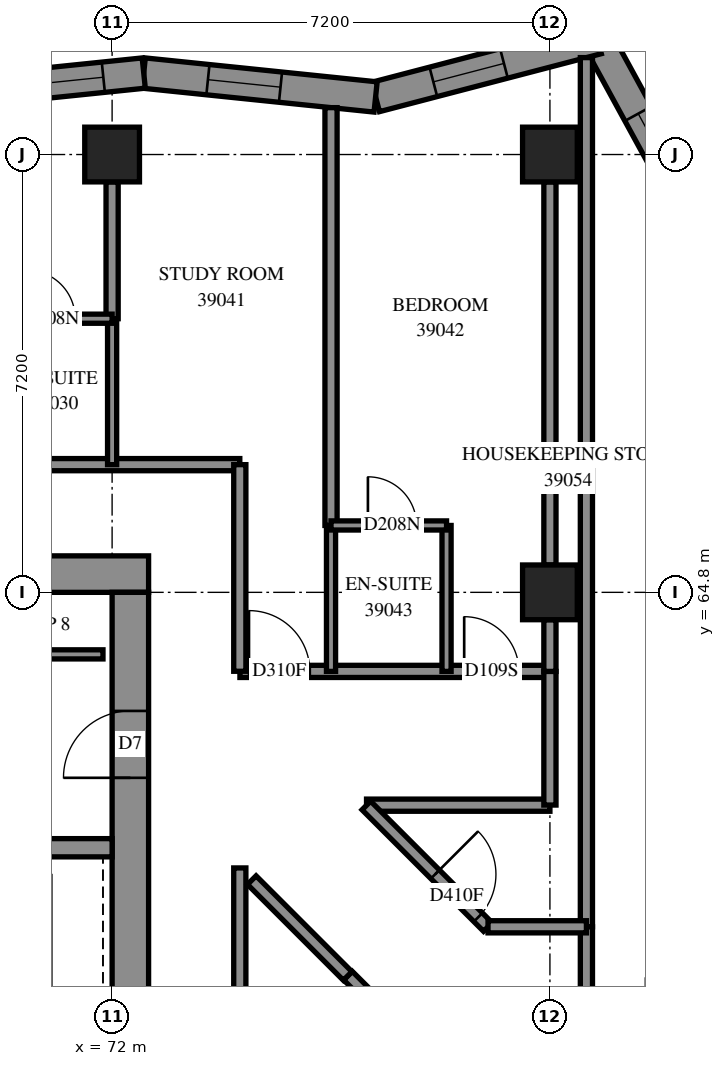
"""IFC4 building model, lengths in metres.
Left out: names, types, materials, properties, quantities, classifications, styles, units other than length and angle.
Written with IfcOpenShell. Run it as: python <this file> out.ifc"""

import sys

from ifc_helpers import new_model, si_unit, direction, frame, frame_2d, origin, origin_2d, place, context, subcontext, project, spatial, polyline, rectangle, outline, extrude, element, fill, save


model = new_model("IFC4")
c1 = context("Model", 3, precision=1e-05, world=origin(), true_north=direction((0.0, 1.0)))
c2 = subcontext(c1, "Body", "Model", "MODEL_VIEW")
j1 = project(units=[si_unit("LENGTHUNIT", "METRE"), si_unit("PLANEANGLEUNIT", "RADIAN")], contexts=[c1])
p1 = place(None, origin())
s1 = spatial("IfcSite", under=j1, at=p1, CompositionType="ELEMENT")
p2 = place(p1, origin())
s2 = spatial("IfcBuilding", under=s1, at=p2, CompositionType="ELEMENT")
p3 = place(p2, frame((0.0, 0.0, 145.6)))
s3 = spatial("IfcBuildingStorey", under=s2, at=p3, CompositionType="ELEMENT", Elevation=145.6)
for number, where, z_axis, x_axis in (
    (1, (72.0, 72.0, 0.0), (0.0, 0.0, 1.0), (1.0, 0.0, 0.0)),
    (2, (79.2, 64.8, 0.0), (0.0, 0.0, 1.0), (1.0, 0.0, 0.0)),
    (3, (79.2, 72.0, 0.0), (0.0, 0.0, 1.0), (1.0, 0.0, 0.0)),
):
    element("IfcColumn", number, at=place(p3, frame(where, z_axis=z_axis, x_axis=x_axis)), inside=s3, PredefinedType="COLUMN", context=c2, shape_type="SweptSolid", body=[
        extrude(rectangle(XDim=0.9, YDim=0.9, at=origin_2d()), origin(), (0.0, 0.0, 1.0), 3.1),
    ])
p4 = place(p3, frame((57.0, 65.1, -0.3), z_axis=(0.0, 0.0, 1.0), x_axis=(1.0, 0.0, 0.0)))
e4 = element("IfcWall", 4, at=p4, inside=s3, PredefinedType="SHEAR", context=c2, shape_type="SweptSolid", body=[
    extrude(rectangle(XDim=15.6, YDim=0.6, at=frame_2d((7.8, 0.0))), origin(), (0.0, 0.0, 1.0), 2.7),
])
p5 = place(p4, frame((10.6, 0.0, 0.3)))
e5 = element("IfcOpeningElement", 5, at=p5, cuts=e4, PredefinedType="OPENING", context=c2, shape_type="SweptSolid", body=[
    extrude(rectangle(XDim=0.8, YDim=2.1, at=frame_2d((0.4, 1.05))), frame((0.0, 0.31, 0.0), z_axis=(0.0, -1.0, 0.0), x_axis=(1.0, 0.0, 0.0)), (0.0, 0.0, 1.0), 0.62),
])
p6 = place(p3, frame((72.3, 50.4, -0.3), z_axis=(0.0, 0.0, 1.0), x_axis=(0.0, 1.0, 0.0)))
e6 = element("IfcWall", 6, at=p6, inside=s3, PredefinedType="SHEAR", context=c2, shape_type="SweptSolid", body=[
    extrude(rectangle(XDim=14.4, YDim=0.6, at=frame_2d((7.2, 0.0))), origin(), (0.0, 0.0, 1.0), 2.7),
])
p7 = place(p6, frame((4.55, 0.0, 0.3)))
e7 = element("IfcOpeningElement", 7, at=p7, cuts=e6, PredefinedType="OPENING", context=c2, shape_type="SweptSolid", body=[
    extrude(rectangle(XDim=1.1, YDim=2.1, at=frame_2d((0.55, 1.05))), frame((0.0, 0.31, 0.0), z_axis=(0.0, -1.0, 0.0), x_axis=(1.0, 0.0, 0.0)), (0.0, 0.0, 1.0), 0.62),
])
p8 = place(p6, frame((11.35, 0.0, 0.3)))
e8 = element("IfcOpeningElement", 8, at=p8, cuts=e6, PredefinedType="OPENING", context=c2, shape_type="SweptSolid", body=[
    extrude(rectangle(XDim=1.1, YDim=2.1, at=frame_2d((0.55, 1.05))), frame((0.0, 0.31, 0.0), z_axis=(0.0, -1.0, 0.0), x_axis=(1.0, 0.0, 0.0)), (0.0, 0.0, 1.0), 0.62),
])
p9 = place(p3, frame((64.8, 60.6, 0.0), z_axis=(0.0, 0.0, 1.0), x_axis=(1.0, 0.0, 0.0)))
e9 = element("IfcWall", 9, at=p9, inside=s3, PredefinedType="SOLIDWALL", context=c2, shape_type="SweptSolid", body=[
    extrude(rectangle(XDim=7.2, YDim=0.3, at=frame_2d((3.6, 0.0))), origin(), (0.0, 0.0, 1.0), 3.1),
])
p10 = place(p3, frame((76.442, 49.302, -0.3), z_axis=(0.0, 0.0, 1.0), x_axis=(0.7071067812, 0.7071067812, 0.0)))
e10 = element("IfcWall", 10, at=p10, inside=s3, PredefinedType="SHEAR", context=c2, shape_type="SweptSolid", body=[
    extrude(rectangle(XDim=14.4, YDim=0.6, at=frame_2d((7.2, 0.0))), origin(), (0.0, 0.0, 1.0), 2.7),
])
p11 = place(p10, frame((4.55, 0.0, 0.3)))
e11 = element("IfcOpeningElement", 11, at=p11, cuts=e10, PredefinedType="OPENING", context=c2, shape_type="SweptSolid", body=[
    extrude(rectangle(XDim=1.1, YDim=2.1, at=frame_2d((0.55, 1.05))), frame((0.0, 0.31, 0.0), z_axis=(0.0, -1.0, 0.0), x_axis=(1.0, 0.0, 0.0)), (0.0, 0.0, 1.0), 0.62),
])
p12 = place(p10, frame((11.35, 0.0, 0.3)))
e12 = element("IfcOpeningElement", 12, at=p12, cuts=e10, PredefinedType="OPENING", context=c2, shape_type="SweptSolid", body=[
    extrude(rectangle(XDim=1.1, YDim=2.1, at=frame_2d((0.55, 1.05))), frame((0.0, 0.31, 0.0), z_axis=(0.0, -1.0, 0.0), x_axis=(1.0, 0.0, 0.0)), (0.0, 0.0, 1.0), 0.62),
])
p13 = place(p3, frame((81.599, 70.939, 0.0), z_axis=(0.0, 0.0, 1.0), x_axis=(-0.4792902898, 0.8776564351, 0.0)))
e13 = element("IfcWall", 13, at=p13, inside=s3, PredefinedType="SOLIDWALL", context=c2, shape_type="SweptSolid", body=[
    extrude(outline(polyline([(0.051, -0.25), (3.569, -0.25), (3.178, 0.25), (-0.051, 0.25), (0.051, -0.25)])), origin(), (0.0, 0.0, 1.0), 3.1),
])
p14 = place(p13, frame((0.775, 0.0, 0.45)))
e14 = element("IfcOpeningElement", 14, at=p14, cuts=e13, PredefinedType="OPENING", context=c2, shape_type="SweptSolid", body=[
    extrude(rectangle(XDim=1.2, YDim=2.5, at=frame_2d((0.6, 1.25))), frame((0.0, 0.26, 0.0), z_axis=(0.0, -1.0, 0.0), x_axis=(1.0, 0.0, 0.0)), (0.0, 0.0, 1.0), 0.52),
])
p15 = place(p3, frame((79.982, 73.9, 0.0), z_axis=(0.0, 0.0, 1.0), x_axis=(-0.9675383728, -0.2527241522, 0.0)))
e15 = element("IfcWall", 15, at=p15, inside=s3, PredefinedType="SOLIDWALL", context=c2, shape_type="SweptSolid", body=[
    extrude(outline(polyline([(-0.195, -0.25), (3.726, -0.25), (3.816, 0.25), (0.195, 0.25), (-0.195, -0.25)])), origin(), (0.0, 0.0, 1.0), 3.1),
])
p16 = place(p15, frame((1.589, 0.0, 0.45)))
e16 = element("IfcOpeningElement", 16, at=p16, cuts=e15, PredefinedType="OPENING", context=c2, shape_type="SweptSolid", body=[
    extrude(rectangle(XDim=1.2, YDim=2.5, at=frame_2d((0.6, 1.25))), frame((0.0, 0.26, 0.0), z_axis=(0.0, -1.0, 0.0), x_axis=(1.0, 0.0, 0.0)), (0.0, 0.0, 1.0), 0.52),
])
p17 = place(p3, frame((76.333, 72.947, 0.0), z_axis=(0.0, 0.0, 1.0), x_axis=(-0.994730395, 0.10252532, 0.0)))
e17 = element("IfcWall", 17, at=p17, inside=s3, PredefinedType="SOLIDWALL", context=c2, shape_type="SweptSolid", body=[
    extrude(outline(polyline([(0.045, -0.25), (3.859, -0.25), (3.808, 0.25), (-0.045, 0.25), (0.045, -0.25)])), origin(), (0.0, 0.0, 1.0), 3.1),
])
p18 = place(p17, frame((1.572, 0.0, 0.45)))
e18 = element("IfcOpeningElement", 18, at=p18, cuts=e17, PredefinedType="OPENING", context=c2, shape_type="SweptSolid", body=[
    extrude(rectangle(XDim=1.2, YDim=2.5, at=frame_2d((0.6, 1.25))), frame((0.0, 0.26, 0.0), z_axis=(0.0, -1.0, 0.0), x_axis=(1.0, 0.0, 0.0)), (0.0, 0.0, 1.0), 0.52),
])
p19 = place(p3, frame((72.52, 73.34, 0.0), z_axis=(0.0, 0.0, 1.0), x_axis=(-0.9947306832, -0.1025225234, 0.0)))
e19 = element("IfcWall", 19, at=p19, inside=s3, PredefinedType="SOLIDWALL", context=c2, shape_type="SweptSolid", body=[
    extrude(outline(polyline([(-0.026, -0.25), (3.788, -0.25), (3.84, 0.25), (0.026, 0.25), (-0.026, -0.25)])), origin(), (0.0, 0.0, 1.0), 3.1),
])
p20 = place(p19, frame((0.668, 0.0, 0.45)))
e20 = element("IfcOpeningElement", 20, at=p20, cuts=e19, PredefinedType="OPENING", context=c2, shape_type="SweptSolid", body=[
    extrude(rectangle(XDim=2.8, YDim=2.5, at=frame_2d((1.4, 1.25))), frame((0.0, 0.26, 0.0), z_axis=(0.0, -1.0, 0.0), x_axis=(1.0, 0.0, 0.0)), (0.0, 0.0, 1.0), 0.52),
])
p21 = place(p3, frame((64.95, 63.78, 0.0), z_axis=(0.0, 0.0, 1.0), x_axis=(1.0, 0.0, 0.0)))
e21 = element("IfcWall", 21, at=p21, inside=s3, PredefinedType="PARTITIONING", context=c2, shape_type="SweptSolid", body=[
    extrude(rectangle(XDim=6.9, YDim=0.15, at=frame_2d((3.45, 0.0))), origin(), (0.0, 0.0, 1.0), 3.1),
])
p22 = place(p3, frame((55.5, 66.9, 0.0), z_axis=(0.0, 0.0, 1.0), x_axis=(1.0, 0.0, 0.0)))
e22 = element("IfcWall", 22, at=p22, inside=s3, PredefinedType="PARTITIONING", context=c2, shape_type="SweptSolid", body=[
    extrude(rectangle(XDim=18.6, YDim=0.2, at=frame_2d((9.3, 0.0))), origin(), (0.0, 0.0, 1.0), 3.1),
])
p23 = place(p22, frame((4.4, 0.0, 0.0)))
e23 = element("IfcOpeningElement", 23, at=p23, cuts=e22, PredefinedType="OPENING", context=c2, shape_type="SweptSolid", body=[
    extrude(rectangle(XDim=0.9, YDim=2.1, at=frame_2d((0.45, 1.05))), frame((0.0, 0.11, 0.0), z_axis=(0.0, -1.0, 0.0), x_axis=(1.0, 0.0, 0.0)), (0.0, 0.0, 1.0), 0.22),
])
p24 = place(p22, frame((6.1, 0.0, 0.0)))
e24 = element("IfcOpeningElement", 24, at=p24, cuts=e22, PredefinedType="OPENING", context=c2, shape_type="SweptSolid", body=[
    extrude(rectangle(XDim=0.9, YDim=2.1, at=frame_2d((0.45, 1.05))), frame((0.0, 0.11, 0.0), z_axis=(0.0, -1.0, 0.0), x_axis=(1.0, 0.0, 0.0)), (0.0, 0.0, 1.0), 0.22),
])
p25 = place(p22, frame((11.65, 0.0, 0.0)))
e25 = element("IfcOpeningElement", 25, at=p25, cuts=e22, PredefinedType="OPENING", context=c2, shape_type="SweptSolid", body=[
    extrude(rectangle(XDim=0.9, YDim=2.1, at=frame_2d((0.45, 1.05))), frame((0.0, 0.11, 0.0), z_axis=(0.0, -1.0, 0.0), x_axis=(1.0, 0.0, 0.0)), (0.0, 0.0, 1.0), 0.22),
])
p26 = place(p22, frame((13.3, 0.0, 0.0)))
e26 = element("IfcOpeningElement", 26, at=p26, cuts=e22, PredefinedType="OPENING", context=c2, shape_type="SweptSolid", body=[
    extrude(rectangle(XDim=0.9, YDim=2.1, at=frame_2d((0.45, 1.05))), frame((0.0, 0.11, 0.0), z_axis=(0.0, -1.0, 0.0), x_axis=(1.0, 0.0, 0.0)), (0.0, 0.0, 1.0), 0.22),
])
p27 = place(p3, frame((79.8, 59.3, 0.0), z_axis=(0.0, 0.0, 1.0), x_axis=(0.0, 1.0, 0.0)))
e27 = element("IfcWall", 27, at=p27, inside=s3, PredefinedType="PARTITIONING", context=c2, shape_type="SweptSolid", body=[
    extrude(rectangle(XDim=14.294, YDim=0.2, at=frame_2d((7.147, 0.0))), origin(), (0.0, 0.0, 1.0), 3.1),
])
p28 = place(p3, frame((75.6, 65.9, 0.0), z_axis=(0.0, 0.0, 1.0), x_axis=(0.0, 1.0, 0.0)))
e28 = element("IfcWall", 28, at=p28, inside=s3, PredefinedType="PARTITIONING", context=c2, shape_type="SweptSolid", body=[
    extrude(rectangle(XDim=6.871, YDim=0.2, at=frame_2d((3.435, 0.0))), origin(), (0.0, 0.0, 1.0), 3.1),
])
p29 = place(p3, frame((74.1, 53.902, 0.0), z_axis=(0.0, 0.0, 1.0), x_axis=(0.0, 1.0, 0.0)))
e29 = element("IfcWall", 29, at=p29, inside=s3, PredefinedType="PARTITIONING", context=c2, shape_type="SweptSolid", body=[
    extrude(rectangle(XDim=6.366, YDim=0.2, at=frame_2d((3.183, 0.0))), origin(), (0.0, 0.0, 1.0), 3.1),
])
p30 = place(p3, frame((79.2, 65.25, 0.0), z_axis=(0.0, 0.0, 1.0), x_axis=(0.0, 1.0, 0.0)))
e30 = element("IfcWall", 30, at=p30, inside=s3, PredefinedType="PARTITIONING", context=c2, shape_type="SweptSolid", body=[
    extrude(rectangle(XDim=6.3, YDim=0.2, at=frame_2d((3.15, 0.0))), origin(), (0.0, 0.0, 1.0), 3.1),
])
p31 = place(p3, frame((74.102, 63.5, 0.0), z_axis=(0.0, 0.0, 1.0), x_axis=(1.0, 0.0, 0.0)))
e31 = element("IfcWall", 31, at=p31, inside=s3, PredefinedType="PARTITIONING", context=c2, shape_type="SweptSolid", body=[
    extrude(rectangle(XDim=5.098, YDim=0.2, at=frame_2d((2.549, 0.0))), origin(), (0.0, 0.0, 1.0), 3.1),
])
p32 = place(p31, frame((0.149, 0.0, 0.0)))
e32 = element("IfcOpeningElement", 32, at=p32, cuts=e31, PredefinedType="OPENING", context=c2, shape_type="SweptSolid", body=[
    extrude(rectangle(XDim=1.0, YDim=2.1, at=frame_2d((0.5, 1.05))), frame((0.0, 0.11, 0.0), z_axis=(0.0, -1.0, 0.0), x_axis=(1.0, 0.0, 0.0)), (0.0, 0.0, 1.0), 0.22),
])
p33 = place(p31, frame((3.688, 0.0, 0.0)))
e33 = element("IfcOpeningElement", 33, at=p33, cuts=e31, PredefinedType="OPENING", context=c2, shape_type="SweptSolid", body=[
    extrude(rectangle(XDim=0.9, YDim=2.1, at=frame_2d((0.45, 1.05))), frame((0.0, 0.11, 0.0), z_axis=(0.0, -1.0, 0.0), x_axis=(1.0, 0.0, 0.0)), (0.0, 0.0, 1.0), 0.22),
])
p34 = place(p3, frame((79.8, 55.49, 0.0), z_axis=(0.0, 0.0, 1.0), x_axis=(0.0, 1.0, 0.0)))
e34 = element("IfcWall", 34, at=p34, inside=s3, PredefinedType="PARTITIONING", context=c2, shape_type="SweptSolid", body=[
    extrude(rectangle(XDim=3.81, YDim=0.2, at=frame_2d((1.905, 0.0))), origin(), (0.0, 0.0, 1.0), 3.1),
])
p35 = place(p3, frame((74.1, 63.502, 0.0), z_axis=(0.0, 0.0, 1.0), x_axis=(0.0, 1.0, 0.0)))
e35 = element("IfcWall", 35, at=p35, inside=s3, PredefinedType="PARTITIONING", context=c2, shape_type="SweptSolid", body=[
    extrude(rectangle(XDim=3.398, YDim=0.2, at=frame_2d((1.699, 0.0))), origin(), (0.0, 0.0, 1.0), 3.1),
])
p36 = place(p3, frame((76.184, 61.3, 0.0), z_axis=(0.0, 0.0, 1.0), x_axis=(1.0, 0.0, 0.0)))
e36 = element("IfcWall", 36, at=p36, inside=s3, PredefinedType="PARTITIONING", context=c2, shape_type="SweptSolid", body=[
    extrude(rectangle(XDim=3.016, YDim=0.2, at=frame_2d((1.508, 0.0))), origin(), (0.0, 0.0, 1.0), 3.1),
])
p37 = place(p3, frame((76.181, 61.295, 0.0), z_axis=(0.0, 0.0, 1.0), x_axis=(0.7071067812, -0.7071067812, 0.0)))
e37 = element("IfcWall", 37, at=p37, inside=s3, PredefinedType="PARTITIONING", context=c2, shape_type="SweptSolid", body=[
    extrude(rectangle(XDim=2.826, YDim=0.2, at=frame_2d((1.413, 0.0))), origin(), (0.0, 0.0, 1.0), 3.1),
])
p38 = place(p37, frame((1.6, 0.0, 0.0)))
e38 = element("IfcOpeningElement", 38, at=p38, cuts=e37, PredefinedType="OPENING", context=c2, shape_type="SweptSolid", body=[
    extrude(rectangle(XDim=1.0, YDim=2.1, at=frame_2d((0.5, 1.05))), frame((0.0, 0.11, 0.0), z_axis=(0.0, -1.0, 0.0), x_axis=(1.0, 0.0, 0.0)), (0.0, 0.0, 1.0), 0.22),
])
for number, where, z_axis, x_axis in (
    (39, (75.6, 63.5, 0.0), (0.0, 0.0, 1.0), (0.0, 1.0, 0.0)),
    (40, (77.5, 63.5, 0.0), (0.0, 0.0, 1.0), (0.0, 1.0, 0.0)),
    (41, (72.0, 66.9, 0.0), (0.0, 0.0, 1.0), (0.0, 1.0, 0.0)),
):
    element("IfcWall", number, at=place(p3, frame(where, z_axis=z_axis, x_axis=x_axis)), inside=s3, PredefinedType="PARTITIONING", context=c2, shape_type="SweptSolid", body=[
        extrude(rectangle(XDim=2.4, YDim=0.15, at=frame_2d((1.2, 0.0))), origin(), (0.0, 0.0, 1.0), 3.1),
    ])
p39 = place(p3, frame((75.879, 58.497, 0.0), z_axis=(0.0, 0.0, 1.0), x_axis=(0.7075423257, -0.7066709682, 0.0)))
e42 = element("IfcWall", 42, at=p39, inside=s3, PredefinedType="PARTITIONING", context=c2, shape_type="SweptSolid", body=[
    extrude(rectangle(XDim=2.295, YDim=0.2, at=frame_2d((1.148, 0.0))), origin(), (0.0, 0.0, 1.0), 3.1),
])
p40 = place(p3, frame((72.0, 69.3, 0.0), z_axis=(0.0, 0.0, 1.0), x_axis=(0.0, 1.0, 0.0)))
e43 = element("IfcWall", 43, at=p40, inside=s3, PredefinedType="PARTITIONING", context=c2, shape_type="SweptSolid", body=[
    extrude(rectangle(XDim=2.25, YDim=0.2, at=frame_2d((1.125, 0.0))), origin(), (0.0, 0.0, 1.0), 3.1),
])
p41 = place(p3, frame((74.297, 60.067, 0.0), z_axis=(0.0, 0.0, 1.0), x_axis=(0.7071067812, -0.7071067812, 0.0)))
e44 = element("IfcWall", 44, at=p41, inside=s3, PredefinedType="PARTITIONING", context=c2, shape_type="SweptSolid", body=[
    extrude(rectangle(XDim=2.229, YDim=0.2, at=frame_2d((1.114, 0.0))), origin(), (0.0, 0.0, 1.0), 3.1),
])
p42 = place(p3, frame((79.2, 61.302, 0.0), z_axis=(0.0, 0.0, 1.0), x_axis=(0.0, 1.0, 0.0)))
e45 = element("IfcWall", 45, at=p42, inside=s3, PredefinedType="PARTITIONING", context=c2, shape_type="SweptSolid", body=[
    extrude(rectangle(XDim=2.198, YDim=0.2, at=frame_2d((1.099, 0.0))), origin(), (0.0, 0.0, 1.0), 3.1),
])
p43 = place(p3, frame((75.6, 65.9, 0.0), z_axis=(0.0, 0.0, 1.0), x_axis=(1.0, 0.0, 0.0)))
e46 = element("IfcWall", 46, at=p43, inside=s3, PredefinedType="PARTITIONING", context=c2, shape_type="SweptSolid", body=[
    extrude(rectangle(XDim=1.9, YDim=0.15, at=frame_2d((0.95, 0.0))), origin(), (0.0, 0.0, 1.0), 3.1),
])
p44 = place(p43, frame((0.607, 0.0, 0.0)))
e47 = element("IfcOpeningElement", 47, at=p44, cuts=e46, PredefinedType="OPENING", context=c2, shape_type="SweptSolid", body=[
    extrude(rectangle(XDim=0.8, YDim=2.1, at=frame_2d((0.4, 1.05))), frame((0.0, 0.085, 0.0), z_axis=(0.0, -1.0, 0.0), x_axis=(1.0, 0.0, 0.0)), (0.0, 0.0, 1.0), 0.17),
])
p45 = place(p3, frame((70.1, 69.3, 0.0), z_axis=(0.0, 0.0, 1.0), x_axis=(1.0, 0.0, 0.0)))
e48 = element("IfcWall", 48, at=p45, inside=s3, PredefinedType="PARTITIONING", context=c2, shape_type="SweptSolid", body=[
    extrude(rectangle(XDim=1.9, YDim=0.15, at=frame_2d((0.95, 0.0))), origin(), (0.0, 0.0, 1.0), 3.1),
])
p46 = place(p45, frame((0.493, 0.0, 0.0)))
e49 = element("IfcOpeningElement", 49, at=p46, cuts=e48, PredefinedType="OPENING", context=c2, shape_type="SweptSolid", body=[
    extrude(rectangle(XDim=0.8, YDim=2.1, at=frame_2d((0.4, 1.05))), frame((0.0, 0.085, 0.0), z_axis=(0.0, -1.0, 0.0), x_axis=(1.0, 0.0, 0.0)), (0.0, 0.0, 1.0), 0.17),
])
p47 = place(p3, frame((78.182, 59.3, 0.0), z_axis=(0.0, 0.0, 1.0), x_axis=(1.0, 0.0, 0.0)))
e50 = element("IfcWall", 50, at=p47, inside=s3, PredefinedType="PARTITIONING", context=c2, shape_type="SweptSolid", body=[
    extrude(rectangle(XDim=1.618, YDim=0.2, at=frame_2d((0.809, 0.0))), origin(), (0.0, 0.0, 1.0), 3.1),
])
p48 = place(p3, frame((79.2, 63.5, 0.0), z_axis=(0.0, 0.0, 1.0), x_axis=(0.0, 1.0, 0.0)))
e51 = element("IfcWall", 51, at=p48, inside=s3, PredefinedType="PARTITIONING", context=c2, shape_type="SweptSolid", body=[
    extrude(rectangle(XDim=0.85, YDim=0.2, at=frame_2d((0.425, 0.0))), origin(), (0.0, 0.0, 1.0), 3.1),
])
p49 = place(p14, origin())
e52 = element("IfcWindow", 52, at=p49, inside=s3, PartitioningType="SINGLE_PANEL", PredefinedType="WINDOW", context=c2, shape_type="SweptSolid", body=[
    extrude(rectangle(XDim=1.2, YDim=2.5, at=frame_2d((0.6, 1.25))), frame((0.0, 0.18, 0.0), z_axis=(0.0, -1.0, 0.0), x_axis=(1.0, 0.0, 0.0)), (0.0, 0.0, 1.0), 0.06),
])
fill(e14, e52)
p50 = place(p16, origin())
e53 = element("IfcWindow", 53, at=p50, inside=s3, PartitioningType="SINGLE_PANEL", PredefinedType="WINDOW", context=c2, shape_type="SweptSolid", body=[
    extrude(rectangle(XDim=1.2, YDim=2.5, at=frame_2d((0.6, 1.25))), frame((0.0, 0.18, 0.0), z_axis=(0.0, -1.0, 0.0), x_axis=(1.0, 0.0, 0.0)), (0.0, 0.0, 1.0), 0.06),
])
fill(e16, e53)
p51 = place(p18, origin())
e54 = element("IfcWindow", 54, at=p51, inside=s3, PartitioningType="SINGLE_PANEL", PredefinedType="WINDOW", context=c2, shape_type="SweptSolid", body=[
    extrude(rectangle(XDim=1.2, YDim=2.5, at=frame_2d((0.6, 1.25))), frame((0.0, 0.18, 0.0), z_axis=(0.0, -1.0, 0.0), x_axis=(1.0, 0.0, 0.0)), (0.0, 0.0, 1.0), 0.06),
])
fill(e18, e54)
p52 = place(p20, origin())
e55 = element("IfcWindow", 55, at=p52, inside=s3, PartitioningType="SINGLE_PANEL", PredefinedType="WINDOW", context=c2, shape_type="SweptSolid", body=[
    extrude(rectangle(XDim=2.8, YDim=2.5, at=frame_2d((1.4, 1.25))), frame((0.0, 0.18, 0.0), z_axis=(0.0, -1.0, 0.0), x_axis=(1.0, 0.0, 0.0)), (0.0, 0.0, 1.0), 0.06),
])
fill(e20, e55)
p53 = place(p8, origin())
e56 = element("IfcDoor", 56, at=p53, inside=s3, OperationType="SINGLE_SWING_RIGHT", PredefinedType="DOOR", context=c2, shape_type="SweptSolid", body=[
    extrude(rectangle(XDim=1.1, YDim=2.1, at=frame_2d((0.55, 1.05))), frame((0.0, 0.025, 0.0), z_axis=(0.0, -1.0, 0.0), x_axis=(1.0, 0.0, 0.0)), (0.0, 0.0, 1.0), 0.05),
])
fill(e8, e56)
p54 = place(p46, origin())
e57 = element("IfcDoor", 57, at=p54, inside=s3, OperationType="SINGLE_SWING_RIGHT", PredefinedType="DOOR", context=c2, shape_type="SweptSolid", body=[
    extrude(rectangle(XDim=0.8, YDim=2.1, at=frame_2d((0.4, 1.05))), frame((0.0, 0.025, 0.0), z_axis=(0.0, -1.0, 0.0), x_axis=(1.0, 0.0, 0.0)), (0.0, 0.0, 1.0), 0.05),
])
fill(e49, e57)
p55 = place(p32, origin())
e58 = element("IfcDoor", 58, at=p55, inside=s3, OperationType="SINGLE_SWING_RIGHT", PredefinedType="DOOR", context=c2, shape_type="SweptSolid", body=[
    extrude(rectangle(XDim=1.0, YDim=2.1, at=frame_2d((0.5, 1.05))), frame((0.0, 0.025, 0.0), z_axis=(0.0, -1.0, 0.0), x_axis=(1.0, 0.0, 0.0)), (0.0, 0.0, 1.0), 0.05),
])
fill(e32, e58)
p56 = place(p33, origin())
e59 = element("IfcDoor", 59, at=p56, inside=s3, OperationType="SINGLE_SWING_LEFT", PredefinedType="DOOR", context=c2, shape_type="SweptSolid", body=[
    extrude(rectangle(XDim=0.9, YDim=2.1, at=frame_2d((0.45, 1.05))), frame((0.0, 0.025, 0.0), z_axis=(0.0, -1.0, 0.0), x_axis=(1.0, 0.0, 0.0)), (0.0, 0.0, 1.0), 0.05),
])
fill(e33, e59)
p57 = place(p44, origin())
e60 = element("IfcDoor", 60, at=p57, inside=s3, OperationType="SINGLE_SWING_RIGHT", PredefinedType="DOOR", context=c2, shape_type="SweptSolid", body=[
    extrude(rectangle(XDim=0.8, YDim=2.1, at=frame_2d((0.4, 1.05))), frame((0.0, 0.025, 0.0), z_axis=(0.0, -1.0, 0.0), x_axis=(1.0, 0.0, 0.0)), (0.0, 0.0, 1.0), 0.05),
])
fill(e47, e60)
p58 = place(p38, origin())
e61 = element("IfcDoor", 61, at=p58, inside=s3, OperationType="SINGLE_SWING_LEFT", PredefinedType="DOOR", context=c2, shape_type="SweptSolid", body=[
    extrude(rectangle(XDim=1.0, YDim=2.1, at=frame_2d((0.5, 1.05))), frame((0.0, 0.025, 0.0), z_axis=(0.0, -1.0, 0.0), x_axis=(1.0, 0.0, 0.0)), (0.0, 0.0, 1.0), 0.05),
])
fill(e38, e61)
save(model, sys.argv[1])
